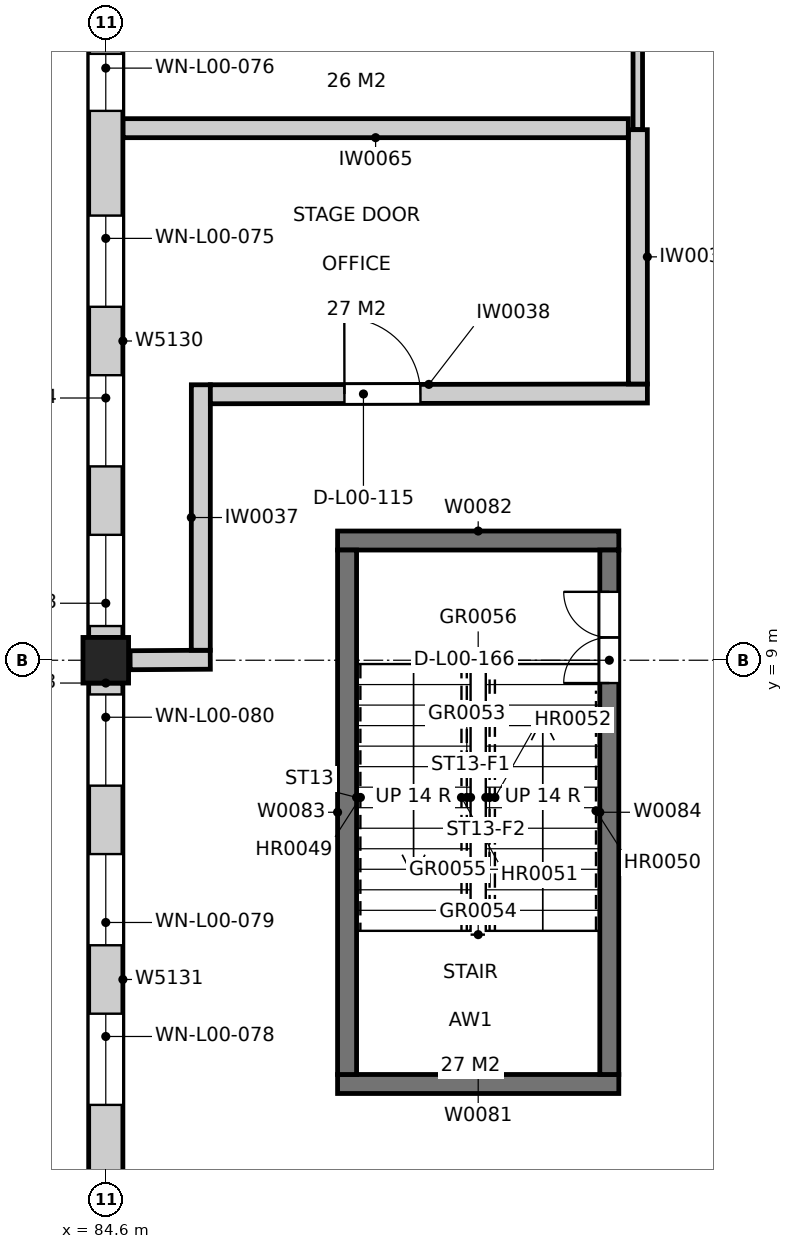
"""IFC4 building model, lengths in metres.
Left out: names, types, materials, properties, quantities, classifications, styles, units other than length and angle.
Written with IfcOpenShell. Run it as: python <this file> out.ifc"""

import sys

from ifc_helpers import new_model, si_unit, direction, frame, frame_2d, origin, origin_2d, place, context, subcontext, project, spatial, rectangle, extrude, element, fill, save


model = new_model("IFC4")
c1 = context("Model", 3, precision=1e-05, world=origin(), true_north=direction((0.0, 1.0)))
c2 = subcontext(c1, "Body", "Model", "MODEL_VIEW")
j1 = project(units=[si_unit("LENGTHUNIT", "METRE"), si_unit("PLANEANGLEUNIT", "RADIAN")], contexts=[c1])
p1 = place(None, origin())
s1 = spatial("IfcSite", under=j1, at=p1, CompositionType="ELEMENT")
p2 = place(p1, origin())
s2 = spatial("IfcBuilding", under=s1, at=p2, CompositionType="ELEMENT")
p3 = place(p2, origin())
s3 = spatial("IfcBuildingStorey", under=s2, at=p3, CompositionType="ELEMENT", Elevation=0.0)
p4 = place(p3, frame((84.6, 9.0, 0.0), z_axis=(0.0, 0.0, 1.0), x_axis=(1.0, 0.0, 0.0)))
e1 = element("IfcColumn", 1, at=p4, inside=s3, PredefinedType="COLUMN", context=c2, shape_type="SweptSolid", body=[
    extrude(rectangle(XDim=0.6, YDim=0.6, at=origin_2d()), origin(), (0.0, 0.0, 1.0), 4.8),
])
for number, where, z_axis, x_axis in (
    (2, (87.65, 3.425, 0.0), (0.0, 0.0, 1.0), (1.0, 0.0, 0.0)),
    (3, (87.65, 10.575, 0.0), (0.0, 0.0, 1.0), (1.0, 0.0, 0.0)),
):
    element("IfcWall", number, at=place(p3, frame(where, z_axis=z_axis, x_axis=x_axis)), inside=s3, PredefinedType="SOLIDWALL", context=c2, shape_type="SweptSolid", body=[
        extrude(rectangle(XDim=3.7, YDim=0.25, at=frame_2d((1.85, 0.0))), origin(), (0.0, 0.0, 1.0), 4.8),
    ])
p5 = place(p3, frame((87.775, 3.55, 0.0), z_axis=(0.0, 0.0, 1.0), x_axis=(0.0, 1.0, 0.0)))
e4 = element("IfcWall", 4, at=p5, inside=s3, PredefinedType="SOLIDWALL", context=c2, shape_type="SweptSolid", body=[
    extrude(rectangle(XDim=6.9, YDim=0.25, at=frame_2d((3.45, 0.0))), origin(), (0.0, 0.0, 1.0), 4.8),
])
p6 = place(p3, frame((91.225, 3.55, 0.0), z_axis=(0.0, 0.0, 1.0), x_axis=(0.0, 1.0, 0.0)))
e5 = element("IfcWall", 5, at=p6, inside=s3, PredefinedType="SOLIDWALL", context=c2, shape_type="SweptSolid", body=[
    extrude(rectangle(XDim=6.9, YDim=0.25, at=frame_2d((3.45, 0.0))), origin(), (0.0, 0.0, 1.0), 4.8),
])
p7 = place(p6, frame((5.15, 0.0, 0.0)))
e6 = element("IfcOpeningElement", 6, at=p7, cuts=e5, PredefinedType="OPENING", context=c2, shape_type="SweptSolid", body=[
    extrude(rectangle(XDim=1.2, YDim=2.1, at=frame_2d((0.6, 1.05))), frame((0.0, 0.135, 0.0), z_axis=(0.0, -1.0, 0.0), x_axis=(1.0, 0.0, 0.0)), (0.0, 0.0, 1.0), 0.27),
])
p8 = place(p3, frame((91.6, 15.98, 0.0), z_axis=(0.0, 0.0, 1.0), x_axis=(-0.000341017577, 0.999999941854, 0.0)))
e7 = element("IfcWall", 7, at=p8, inside=s3, PredefinedType="PARTITIONING", context=c2, shape_type="SweptSolid", body=[
    extrude(rectangle(XDim=3.58, YDim=0.125, at=frame_2d((1.79, 0.0))), origin(), (0.0, 0.0, 1.0), 3.84),
])
p9 = place(p3, frame((84.92, 9.0, 0.0), z_axis=(0.0, 0.0, 1.0), x_axis=(0.999980478361, 0.006248431594, 0.0)))
e8 = element("IfcWall", 8, at=p9, inside=s3, PredefinedType="PARTITIONING", context=c2, shape_type="SweptSolid", body=[
    extrude(rectangle(XDim=1.055, YDim=0.25, at=frame_2d((0.527, 0.0))), origin(), (0.0, 0.0, 1.0), 3.84),
])
p10 = place(p3, frame((85.85, 9.131, 0.0), z_axis=(0.0, 0.0, 1.0), x_axis=(0.00027958341, 0.999999960917, 0.0)))
e9 = element("IfcWall", 9, at=p10, inside=s3, PredefinedType="PARTITIONING", context=c2, shape_type="SweptSolid", body=[
    extrude(rectangle(XDim=3.493, YDim=0.25, at=frame_2d((1.747, 0.0))), origin(), (0.0, 0.0, 1.0), 3.84),
])
p11 = place(p3, frame((85.976, 12.499, 0.0), z_axis=(0.0, 0.0, 1.0), x_axis=(0.999998484761, 0.001740826167, 0.0)))
e10 = element("IfcWall", 10, at=p11, inside=s3, PredefinedType="PARTITIONING", context=c2, shape_type="SweptSolid", body=[
    extrude(rectangle(XDim=5.75, YDim=0.25, at=frame_2d((2.875, 0.0))), origin(), (0.0, 0.0, 1.0), 4.64),
])
p12 = place(p11, frame((1.764, 0.0, 0.0)))
e11 = element("IfcOpeningElement", 11, at=p12, cuts=e10, PredefinedType="OPENING", context=c2, shape_type="SweptSolid", body=[
    extrude(rectangle(XDim=1.0, YDim=2.1, at=frame_2d((0.5, 1.05))), frame((0.0, 0.135, 0.0), z_axis=(0.0, -1.0, 0.0), x_axis=(1.0, 0.0, 0.0)), (0.0, 0.0, 1.0), 0.27),
])
p13 = place(p3, frame((91.601, 12.634, 0.0), z_axis=(0.0, 0.0, 1.0), x_axis=(-0.000291864271, 0.999999957408, 0.0)))
e12 = element("IfcWall", 12, at=p13, inside=s3, PredefinedType="PARTITIONING", context=c2, shape_type="SweptSolid", body=[
    extrude(rectangle(XDim=3.346, YDim=0.25, at=frame_2d((1.673, 0.0))), origin(), (0.0, 0.0, 1.0), 3.94),
])
p14 = place(p3, frame((91.475, 16.0, 0.0), z_axis=(0.0, 0.0, 1.0), x_axis=(-1.0, 0.0, 0.0)))
e13 = element("IfcWall", 13, at=p14, inside=s3, PredefinedType="PARTITIONING", context=c2, shape_type="SweptSolid", body=[
    extrude(rectangle(XDim=6.65, YDim=0.25, at=frame_2d((3.325, 0.0))), origin(), (0.0, 0.0, 1.0), 4.64),
])
p15 = place(p3, frame((84.6, 17.1, 0.0), z_axis=(0.0, 0.0, 1.0), x_axis=(0.0, -1.0, 0.0)))
e14 = element("IfcWall", 14, at=p15, inside=s3, PredefinedType="SOLIDWALL", context=c2, shape_type="SweptSolid", body=[
    extrude(rectangle(XDim=7.8, YDim=0.45, at=frame_2d((3.9, 0.0))), origin(), (0.0, 0.0, 1.0), 3.84),
])
p16 = place(p15, frame((6.45, 0.0, 0.9)))
e15 = element("IfcOpeningElement", 15, at=p16, cuts=e14, PredefinedType="OPENING", context=c2, shape_type="SweptSolid", body=[
    extrude(rectangle(XDim=1.2, YDim=2.4, at=frame_2d((0.6, 1.2))), frame((0.0, 0.235, 0.0), z_axis=(0.0, -1.0, 0.0), x_axis=(1.0, 0.0, 0.0)), (0.0, 0.0, 1.0), 0.47),
])
p17 = place(p15, frame((4.35, 0.0, 0.9)))
e16 = element("IfcOpeningElement", 16, at=p17, cuts=e14, PredefinedType="OPENING", context=c2, shape_type="SweptSolid", body=[
    extrude(rectangle(XDim=1.2, YDim=2.4, at=frame_2d((0.6, 1.2))), frame((0.0, 0.235, 0.0), z_axis=(0.0, -1.0, 0.0), x_axis=(1.0, 0.0, 0.0)), (0.0, 0.0, 1.0), 0.47),
])
p18 = place(p15, frame((2.25, 0.0, 0.9)))
e17 = element("IfcOpeningElement", 17, at=p18, cuts=e14, PredefinedType="OPENING", context=c2, shape_type="SweptSolid", body=[
    extrude(rectangle(XDim=1.2, YDim=2.4, at=frame_2d((0.6, 1.2))), frame((0.0, 0.235, 0.0), z_axis=(0.0, -1.0, 0.0), x_axis=(1.0, 0.0, 0.0)), (0.0, 0.0, 1.0), 0.47),
])
p19 = place(p15, frame((0.122, 0.0, 1.8)))
e18 = element("IfcOpeningElement", 18, at=p19, cuts=e14, PredefinedType="OPENING", context=c2, shape_type="SweptSolid", body=[
    extrude(rectangle(XDim=0.75, YDim=0.6, at=frame_2d((0.375, 0.3))), frame((0.0, 0.235, 0.0), z_axis=(0.0, -1.0, 0.0), x_axis=(1.0, 0.0, 0.0)), (0.0, 0.0, 1.0), 0.47),
])
p20 = place(p3, frame((84.6, 8.7, 0.0), z_axis=(0.0, 0.0, 1.0), x_axis=(0.0, -1.0, 0.0)))
e19 = element("IfcWall", 19, at=p20, inside=s3, PredefinedType="SOLIDWALL", context=c2, shape_type="SweptSolid", body=[
    extrude(rectangle(XDim=7.8, YDim=0.45, at=frame_2d((3.9, 0.0))), origin(), (0.0, 0.0, 1.0), 3.84),
])
p21 = place(p20, frame((6.45, 0.0, 0.9)))
e20 = element("IfcOpeningElement", 20, at=p21, cuts=e19, PredefinedType="OPENING", context=c2, shape_type="SweptSolid", body=[
    extrude(rectangle(XDim=1.2, YDim=2.4, at=frame_2d((0.6, 1.2))), frame((0.0, 0.235, 0.0), z_axis=(0.0, -1.0, 0.0), x_axis=(1.0, 0.0, 0.0)), (0.0, 0.0, 1.0), 0.47),
])
p22 = place(p20, frame((4.35, 0.0, 0.9)))
e21 = element("IfcOpeningElement", 21, at=p22, cuts=e19, PredefinedType="OPENING", context=c2, shape_type="SweptSolid", body=[
    extrude(rectangle(XDim=1.2, YDim=2.4, at=frame_2d((0.6, 1.2))), frame((0.0, 0.235, 0.0), z_axis=(0.0, -1.0, 0.0), x_axis=(1.0, 0.0, 0.0)), (0.0, 0.0, 1.0), 0.47),
])
p23 = place(p20, frame((2.25, 0.0, 0.9)))
e22 = element("IfcOpeningElement", 22, at=p23, cuts=e19, PredefinedType="OPENING", context=c2, shape_type="SweptSolid", body=[
    extrude(rectangle(XDim=1.2, YDim=2.4, at=frame_2d((0.6, 1.2))), frame((0.0, 0.235, 0.0), z_axis=(0.0, -1.0, 0.0), x_axis=(1.0, 0.0, 0.0)), (0.0, 0.0, 1.0), 0.47),
])
p24 = place(p20, frame((0.15, 0.0, 0.9)))
e23 = element("IfcOpeningElement", 23, at=p24, cuts=e19, PredefinedType="OPENING", context=c2, shape_type="SweptSolid", body=[
    extrude(rectangle(XDim=1.2, YDim=2.4, at=frame_2d((0.6, 1.2))), frame((0.0, 0.235, 0.0), z_axis=(0.0, -1.0, 0.0), x_axis=(1.0, 0.0, 0.0)), (0.0, 0.0, 1.0), 0.47),
])
p25 = place(p12, origin())
e24 = element("IfcDoor", 24, at=p25, inside=s3, OperationType="SINGLE_SWING_LEFT", PredefinedType="DOOR", context=c2, shape_type="SweptSolid", body=[
    extrude(rectangle(XDim=1.0, YDim=2.1, at=frame_2d((0.5, 1.05))), frame((0.0, 0.025, 0.0), z_axis=(0.0, -1.0, 0.0), x_axis=(1.0, 0.0, 0.0)), (0.0, 0.0, 1.0), 0.05),
])
fill(e11, e24)
p26 = place(p7, origin())
e25 = element("IfcDoor", 25, at=p26, inside=s3, OperationType="DOUBLE_DOOR_SINGLE_SWING", PredefinedType="DOOR", context=c2, shape_type="SweptSolid", body=[
    extrude(rectangle(XDim=1.2, YDim=2.1, at=frame_2d((0.6, 1.05))), frame((0.0, 0.025, 0.0), z_axis=(0.0, -1.0, 0.0), x_axis=(1.0, 0.0, 0.0)), (0.0, 0.0, 1.0), 0.05),
])
fill(e6, e25)
p27 = place(p16, origin())
e26 = element("IfcWindow", 26, at=p27, inside=s3, PartitioningType="SINGLE_PANEL", PredefinedType="WINDOW", context=c2, shape_type="SweptSolid", body=[
    extrude(rectangle(XDim=1.2, YDim=2.4, at=frame_2d((0.6, 1.2))), frame((0.0, 0.135, 0.0), z_axis=(0.0, -1.0, 0.0), x_axis=(1.0, 0.0, 0.0)), (0.0, 0.0, 1.0), 0.06),
])
fill(e15, e26)
p28 = place(p17, origin())
e27 = element("IfcWindow", 27, at=p28, inside=s3, PartitioningType="SINGLE_PANEL", PredefinedType="WINDOW", context=c2, shape_type="SweptSolid", body=[
    extrude(rectangle(XDim=1.2, YDim=2.4, at=frame_2d((0.6, 1.2))), frame((0.0, 0.135, 0.0), z_axis=(0.0, -1.0, 0.0), x_axis=(1.0, 0.0, 0.0)), (0.0, 0.0, 1.0), 0.06),
])
fill(e16, e27)
p29 = place(p18, origin())
e28 = element("IfcWindow", 28, at=p29, inside=s3, PartitioningType="SINGLE_PANEL", PredefinedType="WINDOW", context=c2, shape_type="SweptSolid", body=[
    extrude(rectangle(XDim=1.2, YDim=2.4, at=frame_2d((0.6, 1.2))), frame((0.0, 0.135, 0.0), z_axis=(0.0, -1.0, 0.0), x_axis=(1.0, 0.0, 0.0)), (0.0, 0.0, 1.0), 0.06),
])
fill(e17, e28)
p30 = place(p19, origin())
e29 = element("IfcWindow", 29, at=p30, inside=s3, PartitioningType="SINGLE_PANEL", PredefinedType="WINDOW", context=c2, shape_type="SweptSolid", body=[
    extrude(rectangle(XDim=0.75, YDim=0.6, at=frame_2d((0.375, 0.3))), frame((0.0, 0.035, 0.0), z_axis=(0.0, -1.0, 0.0), x_axis=(1.0, 0.0, 0.0)), (0.0, 0.0, 1.0), 0.06),
])
fill(e18, e29)
p31 = place(p22, origin())
e30 = element("IfcWindow", 30, at=p31, inside=s3, PartitioningType="SINGLE_PANEL", PredefinedType="WINDOW", context=c2, shape_type="SweptSolid", body=[
    extrude(rectangle(XDim=1.2, YDim=2.4, at=frame_2d((0.6, 1.2))), frame((0.0, 0.135, 0.0), z_axis=(0.0, -1.0, 0.0), x_axis=(1.0, 0.0, 0.0)), (0.0, 0.0, 1.0), 0.06),
])
fill(e21, e30)
p32 = place(p23, origin())
e31 = element("IfcWindow", 31, at=p32, inside=s3, PartitioningType="SINGLE_PANEL", PredefinedType="WINDOW", context=c2, shape_type="SweptSolid", body=[
    extrude(rectangle(XDim=1.2, YDim=2.4, at=frame_2d((0.6, 1.2))), frame((0.0, 0.135, 0.0), z_axis=(0.0, -1.0, 0.0), x_axis=(1.0, 0.0, 0.0)), (0.0, 0.0, 1.0), 0.06),
])
fill(e22, e31)
p33 = place(p24, origin())
e32 = element("IfcWindow", 32, at=p33, inside=s3, PartitioningType="SINGLE_PANEL", PredefinedType="WINDOW", context=c2, shape_type="SweptSolid", body=[
    extrude(rectangle(XDim=1.2, YDim=2.4, at=frame_2d((0.6, 1.2))), frame((0.0, 0.135, 0.0), z_axis=(0.0, -1.0, 0.0), x_axis=(1.0, 0.0, 0.0)), (0.0, 0.0, 1.0), 0.06),
])
fill(e23, e32)
save(model, sys.argv[1])
